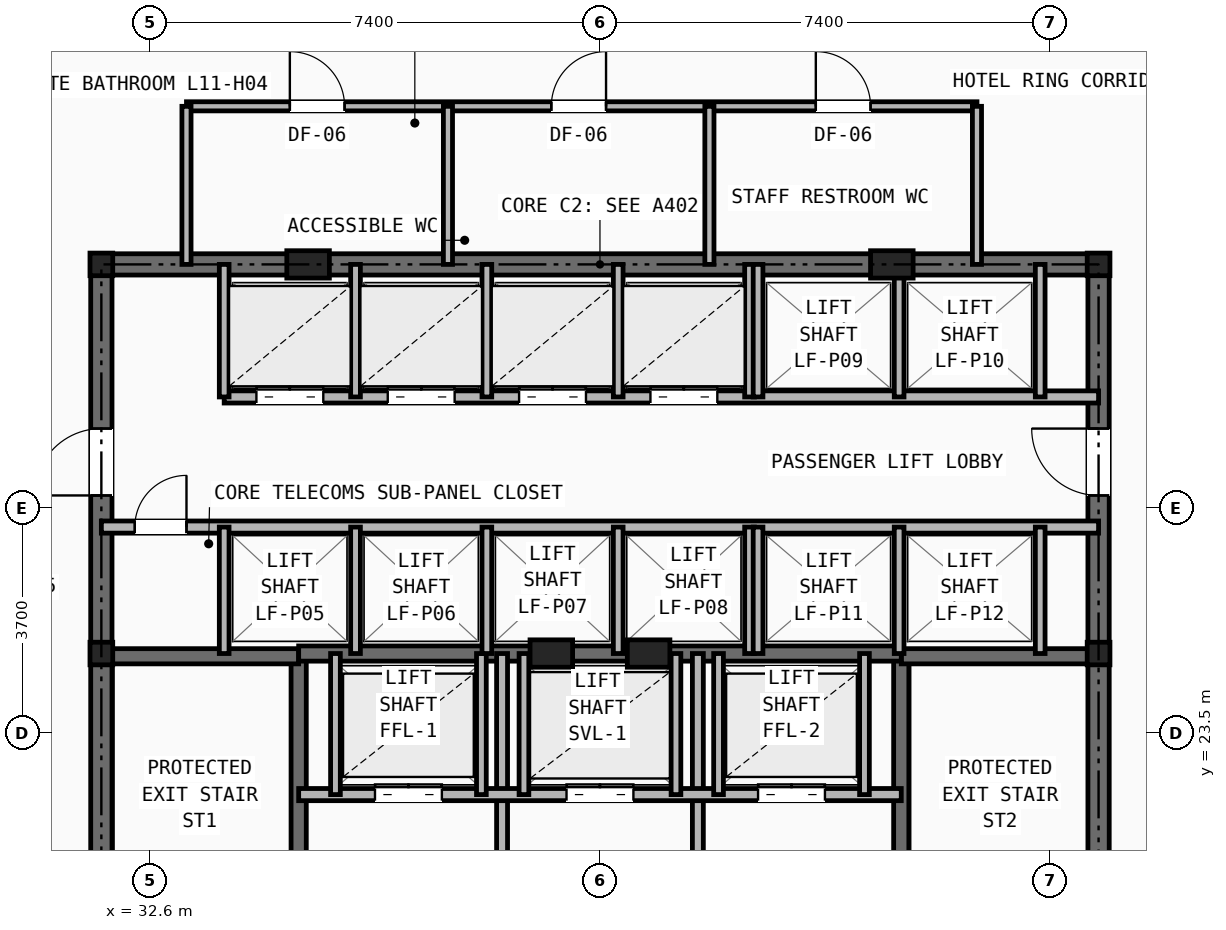
"""IFC4 building model, lengths in metres.
Left out: names, types, materials, properties, quantities, classifications, styles, units other than length and angle.
Written with IfcOpenShell. Run it as: python <this file> out.ifc"""

import sys

from ifc_helpers import new_model, si_unit, direction, frame, frame_2d, origin, origin_2d, place, context, subcontext, project, spatial, rectangle, i_section, extrude, element, fill, save


model = new_model("IFC4")
c1 = context("Model", 3, precision=1e-05, world=origin(), true_north=direction((0.0, 1.0)))
c2 = subcontext(c1, "Body", "Model", "MODEL_VIEW")
j1 = project(units=[si_unit("LENGTHUNIT", "METRE"), si_unit("PLANEANGLEUNIT", "RADIAN")], contexts=[c1])
p1 = place(None, origin())
s1 = spatial("IfcSite", under=j1, at=p1, CompositionType="ELEMENT")
p2 = place(p1, origin())
s2 = spatial("IfcBuilding", under=s1, at=p2, CompositionType="ELEMENT")
p3 = place(p2, frame((0.0, 0.0, 43.2)))
s3 = spatial("IfcBuildingStorey", under=s2, at=p3, CompositionType="ELEMENT", Elevation=43.2)
for number, where, z_axis, x_axis in (
    (1, (31.8, 24.8, 0.0), (0.0, 0.0, 1.0), (1.0, 0.0, 0.0)),
    (2, (48.2, 24.8, 0.0), (0.0, 0.0, 1.0), (1.0, 0.0, 0.0)),
    (3, (31.8, 31.2, 0.0), (0.0, 0.0, 1.0), (1.0, 0.0, 0.0)),
    (4, (48.2, 31.2, 0.0), (0.0, 0.0, 1.0), (1.0, 0.0, 0.0)),
):
    element("IfcColumn", number, at=place(p3, frame(where, z_axis=z_axis, x_axis=x_axis)), inside=s3, PredefinedType="COLUMN", context=c2, shape_type="SweptSolid", body=[
        extrude(i_section(OverallWidth=0.374, OverallDepth=0.372, WebThickness=0.016, FlangeThickness=0.026, at=origin_2d()), origin(), (0.0, 0.0, 1.0), 3.2),
    ])
for number, where, z_axis, x_axis in (
    (5, (35.2, 31.2, 0.0), (0.0, 0.0, 1.0), (1.0, 0.0, 0.0)),
    (6, (44.8, 31.2, 0.0), (0.0, 0.0, 1.0), (1.0, 0.0, 0.0)),
    (7, (39.2, 24.8, 0.0), (0.0, 0.0, 1.0), (1.0, 0.0, 0.0)),
    (8, (40.8, 24.8, 0.0), (0.0, 0.0, 1.0), (1.0, 0.0, 0.0)),
):
    element("IfcColumn", number, at=place(p3, frame(where, z_axis=z_axis, x_axis=x_axis)), inside=s3, PredefinedType="PILASTER", context=c2, shape_type="SweptSolid", body=[
        extrude(rectangle(XDim=0.7, YDim=0.45, at=origin_2d()), origin(), (0.0, 0.0, 1.0), 3.2),
    ])
p4 = place(p3, frame((31.8, 31.2, 0.0), z_axis=(0.0, 0.0, 1.0), x_axis=(1.0, 0.0, 0.0)))
e9 = element("IfcWall", 9, at=p4, inside=s3, PredefinedType="SHEAR", context=c2, shape_type="SweptSolid", body=[
    extrude(rectangle(XDim=16.4, YDim=0.35, at=frame_2d((8.2, 0.0))), origin(), (0.0, 0.0, 1.0), 2.98),
])
p5 = place(p3, frame((31.8, 16.4, 0.0), z_axis=(0.0, 0.0, 1.0), x_axis=(0.0, 1.0, 0.0)))
e10 = element("IfcWall", 10, at=p5, inside=s3, PredefinedType="SHEAR", context=c2, shape_type="SweptSolid", body=[
    extrude(rectangle(XDim=14.8, YDim=0.35, at=frame_2d((7.4, 0.0))), origin(), (0.0, 0.0, 1.0), 2.98),
])
p6 = place(p5, frame((11.0, 0.0, 0.0)))
e11 = element("IfcOpeningElement", 11, at=p6, cuts=e10, PredefinedType="OPENING", context=c2, shape_type="SweptSolid", body=[
    extrude(rectangle(XDim=1.1, YDim=2.15, at=frame_2d((0.55, 1.075))), frame((0.0, 0.185, 0.0), z_axis=(0.0, -1.0, 0.0), x_axis=(1.0, 0.0, 0.0)), (0.0, 0.0, 1.0), 0.37),
])
p7 = place(p3, frame((48.2, 16.4, 0.0), z_axis=(0.0, 0.0, 1.0), x_axis=(0.0, 1.0, 0.0)))
e12 = element("IfcWall", 12, at=p7, inside=s3, PredefinedType="SHEAR", context=c2, shape_type="SweptSolid", body=[
    extrude(rectangle(XDim=14.8, YDim=0.35, at=frame_2d((7.4, 0.0))), origin(), (0.0, 0.0, 1.0), 2.98),
])
p8 = place(p7, frame((11.0, 0.0, 0.0)))
e13 = element("IfcOpeningElement", 13, at=p8, cuts=e12, PredefinedType="OPENING", context=c2, shape_type="SweptSolid", body=[
    extrude(rectangle(XDim=1.1, YDim=2.15, at=frame_2d((0.55, 1.075))), frame((0.0, 0.185, 0.0), z_axis=(0.0, -1.0, 0.0), x_axis=(1.0, 0.0, 0.0)), (0.0, 0.0, 1.0), 0.37),
])
p9 = place(p3, frame((35.045, 16.4, 0.0), z_axis=(0.0, 0.0, 1.0), x_axis=(0.0, 1.0, 0.0)))
e14 = element("IfcWall", 14, at=p9, inside=s3, PredefinedType="SHEAR", context=c2, shape_type="SweptSolid", body=[
    extrude(rectangle(XDim=8.4, YDim=0.25, at=frame_2d((4.2, 0.0))), origin(), (0.0, 0.0, 1.0), 2.98),
])
p10 = place(p9, frame((0.45, 0.0, 0.0)))
e15 = element("IfcOpeningElement", 15, at=p10, cuts=e14, PredefinedType="OPENING", context=c2, shape_type="SweptSolid", body=[
    extrude(rectangle(XDim=0.95, YDim=2.1, at=frame_2d((0.475, 1.05))), frame((0.0, 0.135, 0.0), z_axis=(0.0, -1.0, 0.0), x_axis=(1.0, 0.0, 0.0)), (0.0, 0.0, 1.0), 0.27),
])
p11 = place(p3, frame((31.8, 24.755, 0.0), z_axis=(0.0, 0.0, 1.0), x_axis=(1.0, 0.0, 0.0)))
e16 = element("IfcWall", 16, at=p11, inside=s3, PredefinedType="SHEAR", context=c2, shape_type="SweptSolid", body=[
    extrude(rectangle(XDim=3.245, YDim=0.25, at=frame_2d((1.623, 0.0))), origin(), (0.0, 0.0, 1.0), 2.98),
])
p12 = place(p3, frame((44.955, 16.4, 0.0), z_axis=(0.0, 0.0, 1.0), x_axis=(0.0, 1.0, 0.0)))
e17 = element("IfcWall", 17, at=p12, inside=s3, PredefinedType="SHEAR", context=c2, shape_type="SweptSolid", body=[
    extrude(rectangle(XDim=8.4, YDim=0.25, at=frame_2d((4.2, 0.0))), origin(), (0.0, 0.0, 1.0), 2.98),
])
p13 = place(p12, frame((0.45, 0.0, 0.0)))
e18 = element("IfcOpeningElement", 18, at=p13, cuts=e17, PredefinedType="OPENING", context=c2, shape_type="SweptSolid", body=[
    extrude(rectangle(XDim=0.95, YDim=2.1, at=frame_2d((0.475, 1.05))), frame((0.0, 0.135, 0.0), z_axis=(0.0, -1.0, 0.0), x_axis=(1.0, 0.0, 0.0)), (0.0, 0.0, 1.0), 0.27),
])
p14 = place(p3, frame((44.955, 24.755, 0.0), z_axis=(0.0, 0.0, 1.0), x_axis=(1.0, 0.0, 0.0)))
e19 = element("IfcWall", 19, at=p14, inside=s3, PredefinedType="SHEAR", context=c2, shape_type="SweptSolid", body=[
    extrude(rectangle(XDim=3.245, YDim=0.25, at=frame_2d((1.623, 0.0))), origin(), (0.0, 0.0, 1.0), 2.98),
])
p15 = place(p3, frame((35.045, 24.8, 0.0), z_axis=(0.0, 0.0, 1.0), x_axis=(1.0, 0.0, 0.0)))
e20 = element("IfcWall", 20, at=p15, inside=s3, PredefinedType="SHEAR", context=c2, shape_type="SweptSolid", body=[
    extrude(rectangle(XDim=9.91, YDim=0.25, at=frame_2d((4.955, 0.0))), origin(), (0.0, 0.0, 1.0), 2.98),
])
p16 = place(p3, frame((38.39, 16.4, 0.0), z_axis=(0.0, 0.0, 1.0), x_axis=(0.0, 1.0, 0.0)))
e21 = element("IfcWall", 21, at=p16, inside=s3, PredefinedType="PARTITIONING", context=c2, shape_type="SweptSolid", body=[
    extrude(rectangle(XDim=8.4, YDim=0.18, at=frame_2d((4.2, 0.0))), origin(), (0.0, 0.0, 1.0), 2.431),
])
p17 = place(p16, frame((3.85, 0.0, 0.0)))
e22 = element("IfcOpeningElement", 22, at=p17, cuts=e21, PredefinedType="OPENING", context=c2, shape_type="SweptSolid", body=[
    extrude(rectangle(XDim=0.95, YDim=2.1, at=frame_2d((0.475, 1.05))), frame((0.0, 0.1, 0.0), z_axis=(0.0, -1.0, 0.0), x_axis=(1.0, 0.0, 0.0)), (0.0, 0.0, 1.0), 0.2),
])
p18 = place(p3, frame((41.61, 16.4, 0.0), z_axis=(0.0, 0.0, 1.0), x_axis=(0.0, 1.0, 0.0)))
e23 = element("IfcWall", 23, at=p18, inside=s3, PredefinedType="PARTITIONING", context=c2, shape_type="SweptSolid", body=[
    extrude(rectangle(XDim=8.4, YDim=0.18, at=frame_2d((4.2, 0.0))), origin(), (0.0, 0.0, 1.0), 2.431),
])
p19 = place(p3, frame((35.045, 22.48, 0.0), z_axis=(0.0, 0.0, 1.0), x_axis=(1.0, 0.0, 0.0)))
e24 = element("IfcWall", 24, at=p19, inside=s3, PredefinedType="SOLIDWALL", context=c2, shape_type="SweptSolid", body=[
    extrude(rectangle(XDim=9.91, YDim=0.2, at=frame_2d((4.955, 0.0))), origin(), (0.0, 0.0, 1.0), 2.98),
])
p20 = place(p19, frame((1.255, 0.0, 0.0)))
e25 = element("IfcOpeningElement", 25, at=p20, cuts=e24, PredefinedType="OPENING", context=c2, shape_type="SweptSolid", body=[
    extrude(rectangle(XDim=1.1, YDim=2.15, at=frame_2d((0.55, 1.075))), frame((0.0, 0.11, 0.0), z_axis=(0.0, -1.0, 0.0), x_axis=(1.0, 0.0, 0.0)), (0.0, 0.0, 1.0), 0.22),
])
p21 = place(p19, frame((7.555, 0.0, 0.0)))
e26 = element("IfcOpeningElement", 26, at=p21, cuts=e24, PredefinedType="OPENING", context=c2, shape_type="SweptSolid", body=[
    extrude(rectangle(XDim=1.1, YDim=2.15, at=frame_2d((0.55, 1.075))), frame((0.0, 0.11, 0.0), z_axis=(0.0, -1.0, 0.0), x_axis=(1.0, 0.0, 0.0)), (0.0, 0.0, 1.0), 0.22),
])
p22 = place(p19, frame((4.405, 0.0, 0.0)))
e27 = element("IfcOpeningElement", 27, at=p22, cuts=e24, PredefinedType="OPENING", context=c2, shape_type="SweptSolid", body=[
    extrude(rectangle(XDim=1.1, YDim=2.15, at=frame_2d((0.55, 1.075))), frame((0.0, 0.11, 0.0), z_axis=(0.0, -1.0, 0.0), x_axis=(1.0, 0.0, 0.0)), (0.0, 0.0, 1.0), 0.22),
])
for number, where, z_axis, x_axis in (
    (28, (35.65, 22.48, 0.0), (0.0, 0.0, 1.0), (0.0, 1.0, 0.0)),
    (29, (38.05, 22.48, 0.0), (0.0, 0.0, 1.0), (0.0, 1.0, 0.0)),
    (30, (41.95, 22.48, 0.0), (0.0, 0.0, 1.0), (0.0, 1.0, 0.0)),
    (31, (44.35, 22.48, 0.0), (0.0, 0.0, 1.0), (0.0, 1.0, 0.0)),
    (32, (38.75, 22.48, 0.0), (0.0, 0.0, 1.0), (0.0, 1.0, 0.0)),
    (33, (41.25, 22.48, 0.0), (0.0, 0.0, 1.0), (0.0, 1.0, 0.0)),
):
    element("IfcWall", number, at=place(p3, frame(where, z_axis=z_axis, x_axis=x_axis)), inside=s3, PredefinedType="SOLIDWALL", context=c2, shape_type="SweptSolid", body=[
        extrude(rectangle(XDim=2.32, YDim=0.16, at=frame_2d((1.16, 0.0))), origin(), (0.0, 0.0, 1.0), 2.98),
    ])
p23 = place(p3, frame((33.82, 29.02, 0.0), z_axis=(0.0, 0.0, 1.0), x_axis=(1.0, 0.0, 0.0)))
e34 = element("IfcWall", 34, at=p23, inside=s3, PredefinedType="SOLIDWALL", context=c2, shape_type="SweptSolid", body=[
    extrude(rectangle(XDim=14.38, YDim=0.2, at=frame_2d((7.19, 0.0))), origin(), (0.0, 0.0, 1.0), 2.431),
])
p24 = place(p23, frame((0.53, 0.0, 0.0)))
e35 = element("IfcOpeningElement", 35, at=p24, cuts=e34, PredefinedType="OPENING", context=c2, shape_type="SweptSolid", body=[
    extrude(rectangle(XDim=1.1, YDim=2.15, at=frame_2d((0.55, 1.075))), frame((0.0, 0.11, 0.0), z_axis=(0.0, -1.0, 0.0), x_axis=(1.0, 0.0, 0.0)), (0.0, 0.0, 1.0), 0.22),
])
p25 = place(p23, frame((2.69, 0.0, 0.0)))
e36 = element("IfcOpeningElement", 36, at=p25, cuts=e34, PredefinedType="OPENING", context=c2, shape_type="SweptSolid", body=[
    extrude(rectangle(XDim=1.1, YDim=2.15, at=frame_2d((0.55, 1.075))), frame((0.0, 0.11, 0.0), z_axis=(0.0, -1.0, 0.0), x_axis=(1.0, 0.0, 0.0)), (0.0, 0.0, 1.0), 0.22),
])
p26 = place(p23, frame((4.85, 0.0, 0.0)))
e37 = element("IfcOpeningElement", 37, at=p26, cuts=e34, PredefinedType="OPENING", context=c2, shape_type="SweptSolid", body=[
    extrude(rectangle(XDim=1.1, YDim=2.15, at=frame_2d((0.55, 1.075))), frame((0.0, 0.11, 0.0), z_axis=(0.0, -1.0, 0.0), x_axis=(1.0, 0.0, 0.0)), (0.0, 0.0, 1.0), 0.22),
])
p27 = place(p23, frame((7.01, 0.0, 0.0)))
e38 = element("IfcOpeningElement", 38, at=p27, cuts=e34, PredefinedType="OPENING", context=c2, shape_type="SweptSolid", body=[
    extrude(rectangle(XDim=1.1, YDim=2.15, at=frame_2d((0.55, 1.075))), frame((0.0, 0.11, 0.0), z_axis=(0.0, -1.0, 0.0), x_axis=(1.0, 0.0, 0.0)), (0.0, 0.0, 1.0), 0.22),
])
p28 = place(p3, frame((31.8, 26.88, 0.0), z_axis=(0.0, 0.0, 1.0), x_axis=(1.0, 0.0, 0.0)))
e39 = element("IfcWall", 39, at=p28, inside=s3, PredefinedType="SOLIDWALL", context=c2, shape_type="SweptSolid", body=[
    extrude(rectangle(XDim=16.4, YDim=0.2, at=frame_2d((8.2, 0.0))), origin(), (0.0, 0.0, 1.0), 2.431),
])
p29 = place(p28, frame((0.55, 0.0, 0.0)))
e40 = element("IfcOpeningElement", 40, at=p29, cuts=e39, PredefinedType="OPENING", context=c2, shape_type="SweptSolid", body=[
    extrude(rectangle(XDim=0.85, YDim=2.05, at=frame_2d((0.425, 1.025))), frame((0.0, 0.11, 0.0), z_axis=(0.0, -1.0, 0.0), x_axis=(1.0, 0.0, 0.0)), (0.0, 0.0, 1.0), 0.22),
])
p30 = place(p3, frame((33.82, 29.02, 0.0), z_axis=(0.0, 0.0, 1.0), x_axis=(0.0, 1.0, 0.0)))
e41 = element("IfcWall", 41, at=p30, inside=s3, PredefinedType="SOLIDWALL", context=c2, shape_type="SweptSolid", body=[
    extrude(rectangle(XDim=2.18, YDim=0.16, at=frame_2d((1.09, 0.0))), origin(), (0.0, 0.0, 1.0), 2.431),
])
p31 = place(p3, frame((33.82, 24.8, 0.0), z_axis=(0.0, 0.0, 1.0), x_axis=(0.0, 1.0, 0.0)))
e42 = element("IfcWall", 42, at=p31, inside=s3, PredefinedType="SOLIDWALL", context=c2, shape_type="SweptSolid", body=[
    extrude(rectangle(XDim=2.08, YDim=0.16, at=frame_2d((1.04, 0.0))), origin(), (0.0, 0.0, 1.0), 2.98),
])
for number, where, z_axis, x_axis in (
    (43, (35.98, 29.02, 0.0), (0.0, 0.0, 1.0), (0.0, 1.0, 0.0)),
    (44, (38.14, 29.02, 0.0), (0.0, 0.0, 1.0), (0.0, 1.0, 0.0)),
    (45, (40.3, 29.02, 0.0), (0.0, 0.0, 1.0), (0.0, 1.0, 0.0)),
    (46, (42.46, 29.02, 0.0), (0.0, 0.0, 1.0), (0.0, 1.0, 0.0)),
):
    element("IfcWall", number, at=place(p3, frame(where, z_axis=z_axis, x_axis=x_axis)), inside=s3, PredefinedType="SOLIDWALL", context=c2, shape_type="SweptSolid", body=[
        extrude(rectangle(XDim=2.18, YDim=0.16, at=frame_2d((1.09, 0.0))), origin(), (0.0, 0.0, 1.0), 2.431),
    ])
for number, where, z_axis, x_axis in (
    (47, (35.98, 24.8, 0.0), (0.0, 0.0, 1.0), (0.0, 1.0, 0.0)),
    (48, (38.14, 24.8, 0.0), (0.0, 0.0, 1.0), (0.0, 1.0, 0.0)),
    (49, (40.3, 24.8, 0.0), (0.0, 0.0, 1.0), (0.0, 1.0, 0.0)),
    (50, (42.46, 24.8, 0.0), (0.0, 0.0, 1.0), (0.0, 1.0, 0.0)),
):
    element("IfcWall", number, at=place(p3, frame(where, z_axis=z_axis, x_axis=x_axis)), inside=s3, PredefinedType="SOLIDWALL", context=c2, shape_type="SweptSolid", body=[
        extrude(rectangle(XDim=2.08, YDim=0.16, at=frame_2d((1.04, 0.0))), origin(), (0.0, 0.0, 1.0), 2.98),
    ])
for number, where, z_axis, x_axis in (
    (51, (42.6, 29.02, 0.0), (0.0, 0.0, 1.0), (0.0, 1.0, 0.0)),
    (52, (44.92, 29.02, 0.0), (0.0, 0.0, 1.0), (0.0, 1.0, 0.0)),
    (53, (47.24, 29.02, 0.0), (0.0, 0.0, 1.0), (0.0, 1.0, 0.0)),
):
    element("IfcWall", number, at=place(p3, frame(where, z_axis=z_axis, x_axis=x_axis)), inside=s3, PredefinedType="SOLIDWALL", context=c2, shape_type="SweptSolid", body=[
        extrude(rectangle(XDim=2.18, YDim=0.16, at=frame_2d((1.09, 0.0))), origin(), (0.0, 0.0, 1.0), 2.431),
    ])
for number, where, z_axis, x_axis in (
    (54, (42.6, 24.8, 0.0), (0.0, 0.0, 1.0), (0.0, 1.0, 0.0)),
    (55, (44.92, 24.8, 0.0), (0.0, 0.0, 1.0), (0.0, 1.0, 0.0)),
    (56, (47.24, 24.8, 0.0), (0.0, 0.0, 1.0), (0.0, 1.0, 0.0)),
):
    element("IfcWall", number, at=place(p3, frame(where, z_axis=z_axis, x_axis=x_axis)), inside=s3, PredefinedType="SOLIDWALL", context=c2, shape_type="SweptSolid", body=[
        extrude(rectangle(XDim=2.08, YDim=0.16, at=frame_2d((1.04, 0.0))), origin(), (0.0, 0.0, 1.0), 2.98),
    ])
p32 = place(p3, frame((33.2, 33.8, 0.0), z_axis=(0.0, 0.0, 1.0), x_axis=(1.0, 0.0, 0.0)))
e57 = element("IfcWall", 57, at=p32, inside=s3, PredefinedType="PARTITIONING", context=c2, shape_type="SweptSolid", body=[
    extrude(rectangle(XDim=13.0, YDim=0.15, at=frame_2d((6.5, 0.0))), origin(), (0.0, 0.0, 1.0), 2.98),
])
p33 = place(p32, frame((1.7, 0.0, 0.0)))
e58 = element("IfcOpeningElement", 58, at=p33, cuts=e57, PredefinedType="OPENING", context=c2, shape_type="SweptSolid", body=[
    extrude(rectangle(XDim=0.9, YDim=2.1, at=frame_2d((0.45, 1.05))), frame((0.0, 0.085, 0.0), z_axis=(0.0, -1.0, 0.0), x_axis=(1.0, 0.0, 0.0)), (0.0, 0.0, 1.0), 0.17),
])
p34 = place(p32, frame((6.0, 0.0, 0.0)))
e59 = element("IfcOpeningElement", 59, at=p34, cuts=e57, PredefinedType="OPENING", context=c2, shape_type="SweptSolid", body=[
    extrude(rectangle(XDim=0.9, YDim=2.1, at=frame_2d((0.45, 1.05))), frame((0.0, 0.085, 0.0), z_axis=(0.0, -1.0, 0.0), x_axis=(1.0, 0.0, 0.0)), (0.0, 0.0, 1.0), 0.17),
])
p35 = place(p32, frame((10.35, 0.0, 0.0)))
e60 = element("IfcOpeningElement", 60, at=p35, cuts=e57, PredefinedType="OPENING", context=c2, shape_type="SweptSolid", body=[
    extrude(rectangle(XDim=0.9, YDim=2.1, at=frame_2d((0.45, 1.05))), frame((0.0, 0.085, 0.0), z_axis=(0.0, -1.0, 0.0), x_axis=(1.0, 0.0, 0.0)), (0.0, 0.0, 1.0), 0.17),
])
for number, where, z_axis, x_axis in (
    (61, (33.2, 31.2, 0.0), (0.0, 0.0, 1.0), (0.0, 1.0, 0.0)),
    (62, (46.2, 31.2, 0.0), (0.0, 0.0, 1.0), (0.0, 1.0, 0.0)),
    (63, (37.5, 31.2, 0.0), (0.0, 0.0, 1.0), (0.0, 1.0, 0.0)),
    (64, (41.8, 31.2, 0.0), (0.0, 0.0, 1.0), (0.0, 1.0, 0.0)),
):
    element("IfcWall", number, at=place(p3, frame(where, z_axis=z_axis, x_axis=x_axis)), inside=s3, PredefinedType="PARTITIONING", context=c2, shape_type="SweptSolid", body=[
        extrude(rectangle(XDim=2.6, YDim=0.15, at=frame_2d((1.3, 0.0))), origin(), (0.0, 0.0, 1.0), 2.431),
    ])
p36 = place(p20, origin())
e65 = element("IfcDoor", 65, at=p36, inside=s3, OperationType="DOUBLE_DOOR_SLIDING", PredefinedType="DOOR", context=c2, shape_type="SweptSolid", body=[
    extrude(rectangle(XDim=1.1, YDim=2.15, at=frame_2d((0.55, 1.075))), frame((0.0, 0.025, 0.0), z_axis=(0.0, -1.0, 0.0), x_axis=(1.0, 0.0, 0.0)), (0.0, 0.0, 1.0), 0.05),
])
fill(e25, e65)
p37 = place(p21, origin())
e66 = element("IfcDoor", 66, at=p37, inside=s3, OperationType="DOUBLE_DOOR_SLIDING", PredefinedType="DOOR", context=c2, shape_type="SweptSolid", body=[
    extrude(rectangle(XDim=1.1, YDim=2.15, at=frame_2d((0.55, 1.075))), frame((0.0, 0.025, 0.0), z_axis=(0.0, -1.0, 0.0), x_axis=(1.0, 0.0, 0.0)), (0.0, 0.0, 1.0), 0.05),
])
fill(e26, e66)
p38 = place(p22, origin())
e67 = element("IfcDoor", 67, at=p38, inside=s3, OperationType="DOUBLE_DOOR_SLIDING", PredefinedType="DOOR", context=c2, shape_type="SweptSolid", body=[
    extrude(rectangle(XDim=1.1, YDim=2.15, at=frame_2d((0.55, 1.075))), frame((0.0, 0.025, 0.0), z_axis=(0.0, -1.0, 0.0), x_axis=(1.0, 0.0, 0.0)), (0.0, 0.0, 1.0), 0.05),
])
fill(e27, e67)
p39 = place(p29, origin())
e68 = element("IfcDoor", 68, at=p39, inside=s3, OperationType="SINGLE_SWING_RIGHT", PredefinedType="DOOR", context=c2, shape_type="SweptSolid", body=[
    extrude(rectangle(XDim=0.85, YDim=2.05, at=frame_2d((0.425, 1.025))), frame((0.0, 0.025, 0.0), z_axis=(0.0, -1.0, 0.0), x_axis=(1.0, 0.0, 0.0)), (0.0, 0.0, 1.0), 0.05),
])
fill(e40, e68)
p40 = place(p6, origin())
e69 = element("IfcDoor", 69, at=p40, inside=s3, OperationType="SINGLE_SWING_LEFT", PredefinedType="DOOR", context=c2, shape_type="SweptSolid", body=[
    extrude(rectangle(XDim=1.1, YDim=2.15, at=frame_2d((0.55, 1.075))), frame((0.0, 0.025, 0.0), z_axis=(0.0, -1.0, 0.0), x_axis=(1.0, 0.0, 0.0)), (0.0, 0.0, 1.0), 0.05),
])
fill(e11, e69)
p41 = place(p8, origin())
e70 = element("IfcDoor", 70, at=p41, inside=s3, OperationType="SINGLE_SWING_RIGHT", PredefinedType="DOOR", context=c2, shape_type="SweptSolid", body=[
    extrude(rectangle(XDim=1.1, YDim=2.15, at=frame_2d((0.55, 1.075))), frame((0.0, 0.025, 0.0), z_axis=(0.0, -1.0, 0.0), x_axis=(1.0, 0.0, 0.0)), (0.0, 0.0, 1.0), 0.05),
])
fill(e13, e70)
p42 = place(p24, origin())
e71 = element("IfcDoor", 71, at=p42, inside=s3, OperationType="DOUBLE_DOOR_SLIDING", PredefinedType="DOOR", context=c2, shape_type="SweptSolid", body=[
    extrude(rectangle(XDim=1.1, YDim=2.15, at=frame_2d((0.55, 1.075))), frame((0.0, 0.025, 0.0), z_axis=(0.0, -1.0, 0.0), x_axis=(1.0, 0.0, 0.0)), (0.0, 0.0, 1.0), 0.05),
])
fill(e35, e71)
p43 = place(p25, origin())
e72 = element("IfcDoor", 72, at=p43, inside=s3, OperationType="DOUBLE_DOOR_SLIDING", PredefinedType="DOOR", context=c2, shape_type="SweptSolid", body=[
    extrude(rectangle(XDim=1.1, YDim=2.15, at=frame_2d((0.55, 1.075))), frame((0.0, 0.025, 0.0), z_axis=(0.0, -1.0, 0.0), x_axis=(1.0, 0.0, 0.0)), (0.0, 0.0, 1.0), 0.05),
])
fill(e36, e72)
p44 = place(p26, origin())
e73 = element("IfcDoor", 73, at=p44, inside=s3, OperationType="DOUBLE_DOOR_SLIDING", PredefinedType="DOOR", context=c2, shape_type="SweptSolid", body=[
    extrude(rectangle(XDim=1.1, YDim=2.15, at=frame_2d((0.55, 1.075))), frame((0.0, 0.025, 0.0), z_axis=(0.0, -1.0, 0.0), x_axis=(1.0, 0.0, 0.0)), (0.0, 0.0, 1.0), 0.05),
])
fill(e37, e73)
p45 = place(p27, origin())
e74 = element("IfcDoor", 74, at=p45, inside=s3, OperationType="DOUBLE_DOOR_SLIDING", PredefinedType="DOOR", context=c2, shape_type="SweptSolid", body=[
    extrude(rectangle(XDim=1.1, YDim=2.15, at=frame_2d((0.55, 1.075))), frame((0.0, 0.025, 0.0), z_axis=(0.0, -1.0, 0.0), x_axis=(1.0, 0.0, 0.0)), (0.0, 0.0, 1.0), 0.05),
])
fill(e38, e74)
p46 = place(p33, origin())
e75 = element("IfcDoor", 75, at=p46, inside=s3, OperationType="SINGLE_SWING_LEFT", PredefinedType="DOOR", context=c2, shape_type="SweptSolid", body=[
    extrude(rectangle(XDim=0.9, YDim=2.1, at=frame_2d((0.45, 1.05))), frame((0.0, 0.025, 0.0), z_axis=(0.0, -1.0, 0.0), x_axis=(1.0, 0.0, 0.0)), (0.0, 0.0, 1.0), 0.05),
])
fill(e58, e75)
p47 = place(p34, origin())
e76 = element("IfcDoor", 76, at=p47, inside=s3, OperationType="SINGLE_SWING_RIGHT", PredefinedType="DOOR", context=c2, shape_type="SweptSolid", body=[
    extrude(rectangle(XDim=0.9, YDim=2.1, at=frame_2d((0.45, 1.05))), frame((0.0, 0.025, 0.0), z_axis=(0.0, -1.0, 0.0), x_axis=(1.0, 0.0, 0.0)), (0.0, 0.0, 1.0), 0.05),
])
fill(e59, e76)
p48 = place(p35, origin())
e77 = element("IfcDoor", 77, at=p48, inside=s3, OperationType="SINGLE_SWING_LEFT", PredefinedType="DOOR", context=c2, shape_type="SweptSolid", body=[
    extrude(rectangle(XDim=0.9, YDim=2.1, at=frame_2d((0.45, 1.05))), frame((0.0, 0.025, 0.0), z_axis=(0.0, -1.0, 0.0), x_axis=(1.0, 0.0, 0.0)), (0.0, 0.0, 1.0), 0.05),
])
fill(e60, e77)
save(model, sys.argv[1])
